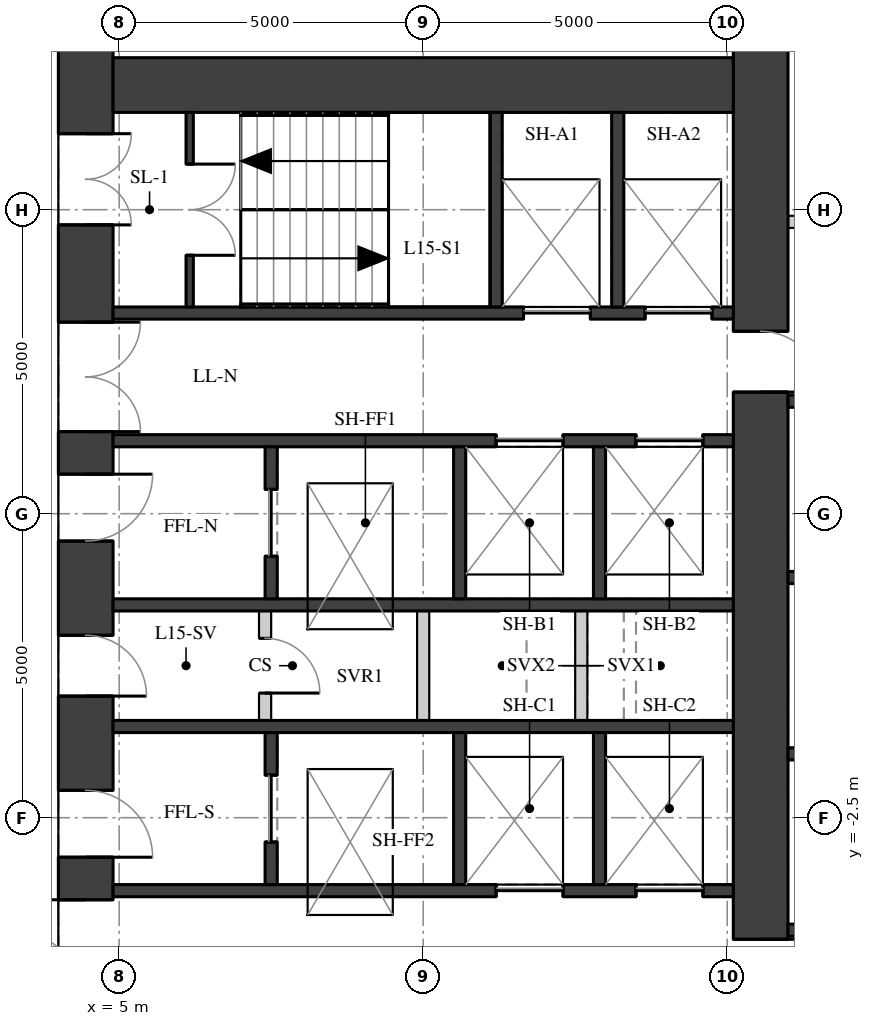
"""IFC4 building model, lengths in metres.
Left out: names, types, materials, properties, quantities, classifications, styles, units other than length and angle.
Written with IfcOpenShell. Run it as: python <this file> out.ifc"""

import sys

from ifc_helpers import new_model, si_unit, direction, frame, frame_2d, origin, place, context, subcontext, project, spatial, rectangle, extrude, element, fill, save


model = new_model("IFC4")
c1 = context("Model", 3, precision=1e-05, world=origin(), true_north=direction((0.0, 1.0)))
c2 = subcontext(c1, "Body", "Model", "MODEL_VIEW")
j1 = project(units=[si_unit("LENGTHUNIT", "METRE"), si_unit("PLANEANGLEUNIT", "RADIAN")], contexts=[c1])
p1 = place(None, origin())
s1 = spatial("IfcSite", under=j1, at=p1, CompositionType="ELEMENT")
p2 = place(p1, origin())
s2 = spatial("IfcBuilding", under=s1, at=p2, CompositionType="ELEMENT")
p3 = place(p2, frame((0.0, 0.0, 58.0)))
s3 = spatial("IfcBuildingStorey", under=s2, at=p3, CompositionType="ELEMENT", Elevation=58.0)
p4 = place(p3, frame((4.45, -11.1, 0.0), z_axis=(0.0, 0.0, 1.0), x_axis=(0.0, 1.0, 0.0)))
e1 = element("IfcWall", 1, at=p4, inside=s3, PredefinedType="SHEAR", context=c2, shape_type="SweptSolid", body=[
    extrude(rectangle(XDim=22.2, YDim=0.9, at=frame_2d((11.1, 0.0))), origin(), (0.0, 0.0, 1.0), 3.02),
])
p5 = place(p4, frame((2.35, 0.0, 0.0)))
e2 = element("IfcOpeningElement", 2, at=p5, cuts=e1, PredefinedType="OPENING", context=c2, shape_type="SweptSolid", body=[
    extrude(rectangle(XDim=1.5, YDim=2.1, at=frame_2d((0.75, 1.05))), frame((0.0, 0.46, 0.0), z_axis=(0.0, -1.0, 0.0), x_axis=(1.0, 0.0, 0.0)), (0.0, 0.0, 1.0), 0.92),
])
p6 = place(p4, frame((5.45, 0.0, 0.0)))
e3 = element("IfcOpeningElement", 3, at=p6, cuts=e1, PredefinedType="OPENING", context=c2, shape_type="SweptSolid", body=[
    extrude(rectangle(XDim=1.8, YDim=2.1, at=frame_2d((0.9, 1.05))), frame((0.0, 0.46, 0.0), z_axis=(0.0, -1.0, 0.0), x_axis=(1.0, 0.0, 0.0)), (0.0, 0.0, 1.0), 0.92),
])
p7 = place(p4, frame((7.95, 0.0, 0.0)))
e4 = element("IfcOpeningElement", 4, at=p7, cuts=e1, PredefinedType="OPENING", context=c2, shape_type="SweptSolid", body=[
    extrude(rectangle(XDim=1.1, YDim=2.1, at=frame_2d((0.55, 1.05))), frame((0.0, 0.46, 0.0), z_axis=(0.0, -1.0, 0.0), x_axis=(1.0, 0.0, 0.0)), (0.0, 0.0, 1.0), 0.92),
])
p8 = place(p4, frame((10.6, 0.0, 0.0)))
e5 = element("IfcOpeningElement", 5, at=p8, cuts=e1, PredefinedType="OPENING", context=c2, shape_type="SweptSolid", body=[
    extrude(rectangle(XDim=1.0, YDim=2.1, at=frame_2d((0.5, 1.05))), frame((0.0, 0.46, 0.0), z_axis=(0.0, -1.0, 0.0), x_axis=(1.0, 0.0, 0.0)), (0.0, 0.0, 1.0), 0.92),
])
p9 = place(p4, frame((13.15, 0.0, 0.0)))
e6 = element("IfcOpeningElement", 6, at=p9, cuts=e1, PredefinedType="OPENING", context=c2, shape_type="SweptSolid", body=[
    extrude(rectangle(XDim=1.1, YDim=2.1, at=frame_2d((0.55, 1.05))), frame((0.0, 0.46, 0.0), z_axis=(0.0, -1.0, 0.0), x_axis=(1.0, 0.0, 0.0)), (0.0, 0.0, 1.0), 0.92),
])
p10 = place(p4, frame((14.95, 0.0, 0.0)))
e7 = element("IfcOpeningElement", 7, at=p10, cuts=e1, PredefinedType="OPENING", context=c2, shape_type="SweptSolid", body=[
    extrude(rectangle(XDim=1.8, YDim=2.1, at=frame_2d((0.9, 1.05))), frame((0.0, 0.46, 0.0), z_axis=(0.0, -1.0, 0.0), x_axis=(1.0, 0.0, 0.0)), (0.0, 0.0, 1.0), 0.92),
])
p11 = place(p4, frame((18.35, 0.0, 0.0)))
e8 = element("IfcOpeningElement", 8, at=p11, cuts=e1, PredefinedType="OPENING", context=c2, shape_type="SweptSolid", body=[
    extrude(rectangle(XDim=1.5, YDim=2.1, at=frame_2d((0.75, 1.05))), frame((0.0, 0.46, 0.0), z_axis=(0.0, -1.0, 0.0), x_axis=(1.0, 0.0, 0.0)), (0.0, 0.0, 1.0), 0.92),
])
p12 = place(p3, frame((15.55, -11.1, 0.0), z_axis=(0.0, 0.0, 1.0), x_axis=(0.0, 1.0, 0.0)))
e9 = element("IfcWall", 9, at=p12, inside=s3, PredefinedType="SHEAR", context=c2, shape_type="SweptSolid", body=[
    extrude(rectangle(XDim=22.2, YDim=0.9, at=frame_2d((11.1, 0.0))), origin(), (0.0, 0.0, 1.0), 3.02),
])
p13 = place(p12, frame((15.6, 0.0, 0.0)))
e10 = element("IfcOpeningElement", 10, at=p13, cuts=e9, PredefinedType="OPENING", context=c2, shape_type="SweptSolid", body=[
    extrude(rectangle(XDim=1.0, YDim=2.1, at=frame_2d((0.5, 1.05))), frame((0.0, 0.46, 0.0), z_axis=(0.0, -1.0, 0.0), x_axis=(1.0, 0.0, 0.0)), (0.0, 0.0, 1.0), 0.92),
])
p14 = place(p12, frame((5.6, 0.0, 0.0)))
e11 = element("IfcOpeningElement", 11, at=p14, cuts=e9, PredefinedType="OPENING", context=c2, shape_type="SweptSolid", body=[
    extrude(rectangle(XDim=1.0, YDim=2.1, at=frame_2d((0.5, 1.05))), frame((0.0, 0.46, 0.0), z_axis=(0.0, -1.0, 0.0), x_axis=(1.0, 0.0, 0.0)), (0.0, 0.0, 1.0), 0.92),
])
p15 = place(p3, frame((4.9, 9.55, 0.0), z_axis=(0.0, 0.0, 1.0), x_axis=(1.0, 0.0, 0.0)))
e12 = element("IfcWall", 12, at=p15, inside=s3, PredefinedType="SHEAR", context=c2, shape_type="SweptSolid", body=[
    extrude(rectangle(XDim=10.2, YDim=0.9, at=frame_2d((5.1, 0.0))), origin(), (0.0, 0.0, 1.0), 3.02),
])
p16 = place(p3, frame((4.9, 5.8, 0.0), z_axis=(0.0, 0.0, 1.0), x_axis=(1.0, 0.0, 0.0)))
e13 = element("IfcWall", 13, at=p16, inside=s3, PredefinedType="SHEAR", context=c2, shape_type="SweptSolid", body=[
    extrude(rectangle(XDim=10.2, YDim=0.2, at=frame_2d((5.1, 0.0))), origin(), (0.0, 0.0, 1.0), 3.02),
])
p17 = place(p16, frame((6.75, 0.0, 0.0)))
e14 = element("IfcOpeningElement", 14, at=p17, cuts=e13, PredefinedType="OPENING", context=c2, shape_type="SweptSolid", body=[
    extrude(rectangle(XDim=1.1, YDim=2.1, at=frame_2d((0.55, 1.05))), frame((0.0, 0.11, 0.0), z_axis=(0.0, -1.0, 0.0), x_axis=(1.0, 0.0, 0.0)), (0.0, 0.0, 1.0), 0.22),
])
p18 = place(p16, frame((8.75, 0.0, 0.0)))
e15 = element("IfcOpeningElement", 15, at=p18, cuts=e13, PredefinedType="OPENING", context=c2, shape_type="SweptSolid", body=[
    extrude(rectangle(XDim=1.1, YDim=2.1, at=frame_2d((0.55, 1.05))), frame((0.0, 0.11, 0.0), z_axis=(0.0, -1.0, 0.0), x_axis=(1.0, 0.0, 0.0)), (0.0, 0.0, 1.0), 0.22),
])
p19 = place(p3, frame((4.9, 3.7, 0.0), z_axis=(0.0, 0.0, 1.0), x_axis=(1.0, 0.0, 0.0)))
e16 = element("IfcWall", 16, at=p19, inside=s3, PredefinedType="SHEAR", context=c2, shape_type="SweptSolid", body=[
    extrude(rectangle(XDim=10.2, YDim=0.2, at=frame_2d((5.1, 0.0))), origin(), (0.0, 0.0, 1.0), 3.02),
])
p20 = place(p19, frame((6.3, 0.0, 0.0)))
e17 = element("IfcOpeningElement", 17, at=p20, cuts=e16, PredefinedType="OPENING", context=c2, shape_type="SweptSolid", body=[
    extrude(rectangle(XDim=1.1, YDim=2.1, at=frame_2d((0.55, 1.05))), frame((0.0, 0.11, 0.0), z_axis=(0.0, -1.0, 0.0), x_axis=(1.0, 0.0, 0.0)), (0.0, 0.0, 1.0), 0.22),
])
p21 = place(p19, frame((8.6, 0.0, 0.0)))
e18 = element("IfcOpeningElement", 18, at=p21, cuts=e16, PredefinedType="OPENING", context=c2, shape_type="SweptSolid", body=[
    extrude(rectangle(XDim=1.1, YDim=2.1, at=frame_2d((0.55, 1.05))), frame((0.0, 0.11, 0.0), z_axis=(0.0, -1.0, 0.0), x_axis=(1.0, 0.0, 0.0)), (0.0, 0.0, 1.0), 0.22),
])
for number, where, z_axis, x_axis in (
    (19, (4.9, 1.0, 0.0), (0.0, 0.0, 1.0), (1.0, 0.0, 0.0)),
    (20, (4.9, -1.0, 0.0), (0.0, 0.0, 1.0), (1.0, 0.0, 0.0)),
):
    element("IfcWall", number, at=place(p3, frame(where, z_axis=z_axis, x_axis=x_axis)), inside=s3, PredefinedType="SHEAR", context=c2, shape_type="SweptSolid", body=[
        extrude(rectangle(XDim=10.2, YDim=0.2, at=frame_2d((5.1, 0.0))), origin(), (0.0, 0.0, 1.0), 3.02),
    ])
p22 = place(p3, frame((4.9, -3.7, 0.0), z_axis=(0.0, 0.0, 1.0), x_axis=(1.0, 0.0, 0.0)))
e21 = element("IfcWall", 21, at=p22, inside=s3, PredefinedType="SHEAR", context=c2, shape_type="SweptSolid", body=[
    extrude(rectangle(XDim=10.2, YDim=0.2, at=frame_2d((5.1, 0.0))), origin(), (0.0, 0.0, 1.0), 3.02),
])
p23 = place(p22, frame((6.3, 0.0, 0.0)))
e22 = element("IfcOpeningElement", 22, at=p23, cuts=e21, PredefinedType="OPENING", context=c2, shape_type="SweptSolid", body=[
    extrude(rectangle(XDim=1.1, YDim=2.1, at=frame_2d((0.55, 1.05))), frame((0.0, 0.11, 0.0), z_axis=(0.0, -1.0, 0.0), x_axis=(1.0, 0.0, 0.0)), (0.0, 0.0, 1.0), 0.22),
])
p24 = place(p22, frame((8.6, 0.0, 0.0)))
e23 = element("IfcOpeningElement", 23, at=p24, cuts=e21, PredefinedType="OPENING", context=c2, shape_type="SweptSolid", body=[
    extrude(rectangle(XDim=1.1, YDim=2.1, at=frame_2d((0.55, 1.05))), frame((0.0, 0.11, 0.0), z_axis=(0.0, -1.0, 0.0), x_axis=(1.0, 0.0, 0.0)), (0.0, 0.0, 1.0), 0.22),
])
for number, where, z_axis, x_axis in (
    (24, (11.2, 5.9, 0.0), (0.0, 0.0, 1.0), (0.0, 1.0, 0.0)),
    (25, (13.2, 5.9, 0.0), (0.0, 0.0, 1.0), (0.0, 1.0, 0.0)),
):
    element("IfcWall", number, at=place(p3, frame(where, z_axis=z_axis, x_axis=x_axis)), inside=s3, PredefinedType="SHEAR", context=c2, shape_type="SweptSolid", body=[
        extrude(rectangle(XDim=3.2, YDim=0.2, at=frame_2d((1.6, 0.0))), origin(), (0.0, 0.0, 1.0), 3.02),
    ])
p25 = place(p3, frame((7.5, 1.1, 0.0), z_axis=(0.0, 0.0, 1.0), x_axis=(0.0, 1.0, 0.0)))
e26 = element("IfcWall", 26, at=p25, inside=s3, PredefinedType="SHEAR", context=c2, shape_type="SweptSolid", body=[
    extrude(rectangle(XDim=2.5, YDim=0.2, at=frame_2d((1.25, 0.0))), origin(), (0.0, 0.0, 1.0), 3.02),
])
p26 = place(p25, frame((0.7, 0.0, 0.0)))
e27 = element("IfcOpeningElement", 27, at=p26, cuts=e26, PredefinedType="OPENING", context=c2, shape_type="SweptSolid", body=[
    extrude(rectangle(XDim=1.1, YDim=2.1, at=frame_2d((0.55, 1.05))), frame((0.0, 0.11, 0.0), z_axis=(0.0, -1.0, 0.0), x_axis=(1.0, 0.0, 0.0)), (0.0, 0.0, 1.0), 0.22),
])
p27 = place(p3, frame((7.5, -3.6, 0.0), z_axis=(0.0, 0.0, 1.0), x_axis=(0.0, 1.0, 0.0)))
e28 = element("IfcWall", 28, at=p27, inside=s3, PredefinedType="SHEAR", context=c2, shape_type="SweptSolid", body=[
    extrude(rectangle(XDim=2.5, YDim=0.2, at=frame_2d((1.25, 0.0))), origin(), (0.0, 0.0, 1.0), 3.02),
])
p28 = place(p27, frame((0.7, 0.0, 0.0)))
e29 = element("IfcOpeningElement", 29, at=p28, cuts=e28, PredefinedType="OPENING", context=c2, shape_type="SweptSolid", body=[
    extrude(rectangle(XDim=1.1, YDim=2.1, at=frame_2d((0.55, 1.05))), frame((0.0, 0.11, 0.0), z_axis=(0.0, -1.0, 0.0), x_axis=(1.0, 0.0, 0.0)), (0.0, 0.0, 1.0), 0.22),
])
for number, where, z_axis, x_axis in (
    (30, (10.6, 1.1, 0.0), (0.0, 0.0, 1.0), (0.0, 1.0, 0.0)),
    (31, (10.6, -3.6, 0.0), (0.0, 0.0, 1.0), (0.0, 1.0, 0.0)),
    (32, (12.9, 1.1, 0.0), (0.0, 0.0, 1.0), (0.0, 1.0, 0.0)),
    (33, (12.9, -3.6, 0.0), (0.0, 0.0, 1.0), (0.0, 1.0, 0.0)),
):
    element("IfcWall", number, at=place(p3, frame(where, z_axis=z_axis, x_axis=x_axis)), inside=s3, PredefinedType="SHEAR", context=c2, shape_type="SweptSolid", body=[
        extrude(rectangle(XDim=2.5, YDim=0.2, at=frame_2d((1.25, 0.0))), origin(), (0.0, 0.0, 1.0), 3.02),
    ])
p29 = place(p3, frame((6.16, 5.9, 0.0), z_axis=(0.0, 0.0, 1.0), x_axis=(0.0, 1.0, 0.0)))
e34 = element("IfcWall", 34, at=p29, inside=s3, PredefinedType="SHEAR", context=c2, shape_type="SweptSolid", body=[
    extrude(rectangle(XDim=3.2, YDim=0.12, at=frame_2d((1.6, 0.0))), origin(), (0.0, 0.0, 1.0), 3.02),
])
p30 = place(p29, frame((0.85, 0.0, 0.0)))
e35 = element("IfcOpeningElement", 35, at=p30, cuts=e34, PredefinedType="OPENING", context=c2, shape_type="SweptSolid", body=[
    extrude(rectangle(XDim=1.5, YDim=2.1, at=frame_2d((0.75, 1.05))), frame((0.0, 0.07, 0.0), z_axis=(0.0, -1.0, 0.0), x_axis=(1.0, 0.0, 0.0)), (0.0, 0.0, 1.0), 0.14),
])
p31 = place(p3, frame((7.4, -0.9, 0.0), z_axis=(0.0, 0.0, 1.0), x_axis=(0.0, 1.0, 0.0)))
e36 = element("IfcWall", 36, at=p31, inside=s3, PredefinedType="PARTITIONING", context=c2, shape_type="SweptSolid", body=[
    extrude(rectangle(XDim=1.8, YDim=0.2, at=frame_2d((0.9, 0.0))), origin(), (0.0, 0.0, 1.0), 3.02),
])
p32 = place(p31, frame((0.45, 0.0, 0.0)))
e37 = element("IfcOpeningElement", 37, at=p32, cuts=e36, PredefinedType="OPENING", context=c2, shape_type="SweptSolid", body=[
    extrude(rectangle(XDim=0.9, YDim=2.1, at=frame_2d((0.45, 1.05))), frame((0.0, 0.11, 0.0), z_axis=(0.0, -1.0, 0.0), x_axis=(1.0, 0.0, 0.0)), (0.0, 0.0, 1.0), 0.22),
])
for number, where, z_axis, x_axis in (
    (38, (10.0, -0.9, 0.0), (0.0, 0.0, 1.0), (0.0, 1.0, 0.0)),
    (39, (12.6, -0.9, 0.0), (0.0, 0.0, 1.0), (0.0, 1.0, 0.0)),
):
    element("IfcWall", number, at=place(p3, frame(where, z_axis=z_axis, x_axis=x_axis)), inside=s3, PredefinedType="PARTITIONING", context=c2, shape_type="SweptSolid", body=[
        extrude(rectangle(XDim=1.8, YDim=0.2, at=frame_2d((0.9, 0.0))), origin(), (0.0, 0.0, 1.0), 3.02),
    ])
for number, where, z_axis, x_axis in (
    (40, (16.0, -4.35, 0.0), (0.0, 0.0, 1.0), (1.0, 0.0, 0.0)),
    (41, (16.0, -1.45, 0.0), (0.0, 0.0, 1.0), (1.0, 0.0, 0.0)),
    (42, (16.0, 1.45, 0.0), (0.0, 0.0, 1.0), (1.0, 0.0, 0.0)),
    (43, (16.0, 4.35, 0.0), (0.0, 0.0, 1.0), (1.0, 0.0, 0.0)),
):
    element("IfcWall", number, at=place(p3, frame(where, z_axis=z_axis, x_axis=x_axis)), inside=s3, PredefinedType="SHEAR", context=c2, shape_type="SweptSolid", body=[
        extrude(rectangle(XDim=2.3, YDim=0.2, at=frame_2d((1.15, 0.0))), origin(), (0.0, 0.0, 1.0), 3.02),
    ])
p33 = place(p3, frame((16.0, 7.3, 0.0), z_axis=(0.0, 0.0, 1.0), x_axis=(1.0, 0.0, 0.0)))
e44 = element("IfcWall", 44, at=p33, inside=s3, PredefinedType="PARTITIONING", context=c2, shape_type="SweptSolid", body=[
    extrude(rectangle(XDim=2.3, YDim=0.2, at=frame_2d((1.15, 0.0))), origin(), (0.0, 0.0, 1.0), 3.02),
])
p34 = place(p33, frame((0.2, 0.0, 0.0)))
e45 = element("IfcOpeningElement", 45, at=p34, cuts=e44, PredefinedType="OPENING", context=c2, shape_type="SweptSolid", body=[
    extrude(rectangle(XDim=0.9, YDim=2.1, at=frame_2d((0.45, 1.05))), frame((0.0, 0.11, 0.0), z_axis=(0.0, -1.0, 0.0), x_axis=(1.0, 0.0, 0.0)), (0.0, 0.0, 1.0), 0.22),
])
p35 = place(p6, origin())
e46 = element("IfcDoor", 46, at=p35, inside=s3, OperationType="DOUBLE_DOOR_SINGLE_SWING", PredefinedType="DOOR", context=c2, shape_type="SweptSolid", body=[
    extrude(rectangle(XDim=1.8, YDim=2.1, at=frame_2d((0.9, 1.05))), frame((0.0, 0.025, 0.0), z_axis=(0.0, -1.0, 0.0), x_axis=(1.0, 0.0, 0.0)), (0.0, 0.0, 1.0), 0.05),
])
fill(e3, e46)
p36 = place(p7, origin())
e47 = element("IfcDoor", 47, at=p36, inside=s3, OperationType="SINGLE_SWING_RIGHT", PredefinedType="DOOR", context=c2, shape_type="SweptSolid", body=[
    extrude(rectangle(XDim=1.1, YDim=2.1, at=frame_2d((0.55, 1.05))), frame((0.0, 0.025, 0.0), z_axis=(0.0, -1.0, 0.0), x_axis=(1.0, 0.0, 0.0)), (0.0, 0.0, 1.0), 0.05),
])
fill(e4, e47)
p37 = place(p8, origin())
e48 = element("IfcDoor", 48, at=p37, inside=s3, OperationType="SINGLE_SWING_RIGHT", PredefinedType="DOOR", context=c2, shape_type="SweptSolid", body=[
    extrude(rectangle(XDim=1.0, YDim=2.1, at=frame_2d((0.5, 1.05))), frame((0.0, 0.025, 0.0), z_axis=(0.0, -1.0, 0.0), x_axis=(1.0, 0.0, 0.0)), (0.0, 0.0, 1.0), 0.05),
])
fill(e5, e48)
p38 = place(p9, origin())
e49 = element("IfcDoor", 49, at=p38, inside=s3, OperationType="SINGLE_SWING_LEFT", PredefinedType="DOOR", context=c2, shape_type="SweptSolid", body=[
    extrude(rectangle(XDim=1.1, YDim=2.1, at=frame_2d((0.55, 1.05))), frame((0.0, 0.025, 0.0), z_axis=(0.0, -1.0, 0.0), x_axis=(1.0, 0.0, 0.0)), (0.0, 0.0, 1.0), 0.05),
])
fill(e6, e49)
p39 = place(p10, origin())
e50 = element("IfcDoor", 50, at=p39, inside=s3, OperationType="DOUBLE_DOOR_SINGLE_SWING", PredefinedType="DOOR", context=c2, shape_type="SweptSolid", body=[
    extrude(rectangle(XDim=1.8, YDim=2.1, at=frame_2d((0.9, 1.05))), frame((0.0, 0.025, 0.0), z_axis=(0.0, -1.0, 0.0), x_axis=(1.0, 0.0, 0.0)), (0.0, 0.0, 1.0), 0.05),
])
fill(e7, e50)
p40 = place(p11, origin())
e51 = element("IfcDoor", 51, at=p40, inside=s3, OperationType="DOUBLE_DOOR_SINGLE_SWING", PredefinedType="DOOR", context=c2, shape_type="SweptSolid", body=[
    extrude(rectangle(XDim=1.5, YDim=2.1, at=frame_2d((0.75, 1.05))), frame((0.0, 0.025, 0.0), z_axis=(0.0, -1.0, 0.0), x_axis=(1.0, 0.0, 0.0)), (0.0, 0.0, 1.0), 0.05),
])
fill(e8, e51)
p41 = place(p30, origin())
e52 = element("IfcDoor", 52, at=p41, inside=s3, OperationType="DOUBLE_DOOR_SINGLE_SWING", PredefinedType="DOOR", context=c2, shape_type="SweptSolid", body=[
    extrude(rectangle(XDim=1.5, YDim=2.1, at=frame_2d((0.75, 1.05))), frame((0.0, 0.025, 0.0), z_axis=(0.0, -1.0, 0.0), x_axis=(1.0, 0.0, 0.0)), (0.0, 0.0, 1.0), 0.05),
])
fill(e35, e52)
p42 = place(p17, origin())
e53 = element("IfcDoor", 53, at=p42, inside=s3, OperationType="DOUBLE_DOOR_SLIDING", PredefinedType="DOOR", context=c2, shape_type="SweptSolid", body=[
    extrude(rectangle(XDim=1.1, YDim=2.1, at=frame_2d((0.55, 1.05))), frame((0.0, 0.025, 0.0), z_axis=(0.0, -1.0, 0.0), x_axis=(1.0, 0.0, 0.0)), (0.0, 0.0, 1.0), 0.05),
])
fill(e14, e53)
p43 = place(p18, origin())
e54 = element("IfcDoor", 54, at=p43, inside=s3, OperationType="DOUBLE_DOOR_SLIDING", PredefinedType="DOOR", context=c2, shape_type="SweptSolid", body=[
    extrude(rectangle(XDim=1.1, YDim=2.1, at=frame_2d((0.55, 1.05))), frame((0.0, 0.025, 0.0), z_axis=(0.0, -1.0, 0.0), x_axis=(1.0, 0.0, 0.0)), (0.0, 0.0, 1.0), 0.05),
])
fill(e15, e54)
p44 = place(p20, origin())
e55 = element("IfcDoor", 55, at=p44, inside=s3, OperationType="DOUBLE_DOOR_SLIDING", PredefinedType="DOOR", context=c2, shape_type="SweptSolid", body=[
    extrude(rectangle(XDim=1.1, YDim=2.1, at=frame_2d((0.55, 1.05))), frame((0.0, 0.025, 0.0), z_axis=(0.0, -1.0, 0.0), x_axis=(1.0, 0.0, 0.0)), (0.0, 0.0, 1.0), 0.05),
])
fill(e17, e55)
p45 = place(p21, origin())
e56 = element("IfcDoor", 56, at=p45, inside=s3, OperationType="DOUBLE_DOOR_SLIDING", PredefinedType="DOOR", context=c2, shape_type="SweptSolid", body=[
    extrude(rectangle(XDim=1.1, YDim=2.1, at=frame_2d((0.55, 1.05))), frame((0.0, 0.025, 0.0), z_axis=(0.0, -1.0, 0.0), x_axis=(1.0, 0.0, 0.0)), (0.0, 0.0, 1.0), 0.05),
])
fill(e18, e56)
p46 = place(p23, origin())
e57 = element("IfcDoor", 57, at=p46, inside=s3, OperationType="DOUBLE_DOOR_SLIDING", PredefinedType="DOOR", context=c2, shape_type="SweptSolid", body=[
    extrude(rectangle(XDim=1.1, YDim=2.1, at=frame_2d((0.55, 1.05))), frame((0.0, 0.025, 0.0), z_axis=(0.0, -1.0, 0.0), x_axis=(1.0, 0.0, 0.0)), (0.0, 0.0, 1.0), 0.05),
])
fill(e22, e57)
p47 = place(p24, origin())
e58 = element("IfcDoor", 58, at=p47, inside=s3, OperationType="DOUBLE_DOOR_SLIDING", PredefinedType="DOOR", context=c2, shape_type="SweptSolid", body=[
    extrude(rectangle(XDim=1.1, YDim=2.1, at=frame_2d((0.55, 1.05))), frame((0.0, 0.025, 0.0), z_axis=(0.0, -1.0, 0.0), x_axis=(1.0, 0.0, 0.0)), (0.0, 0.0, 1.0), 0.05),
])
fill(e23, e58)
p48 = place(p26, origin())
e59 = element("IfcDoor", 59, at=p48, inside=s3, OperationType="DOUBLE_DOOR_SLIDING", PredefinedType="DOOR", context=c2, shape_type="SweptSolid", body=[
    extrude(rectangle(XDim=1.1, YDim=2.1, at=frame_2d((0.55, 1.05))), frame((0.0, 0.025, 0.0), z_axis=(0.0, -1.0, 0.0), x_axis=(1.0, 0.0, 0.0)), (0.0, 0.0, 1.0), 0.05),
])
fill(e27, e59)
p49 = place(p28, origin())
e60 = element("IfcDoor", 60, at=p49, inside=s3, OperationType="DOUBLE_DOOR_SLIDING", PredefinedType="DOOR", context=c2, shape_type="SweptSolid", body=[
    extrude(rectangle(XDim=1.1, YDim=2.1, at=frame_2d((0.55, 1.05))), frame((0.0, 0.025, 0.0), z_axis=(0.0, -1.0, 0.0), x_axis=(1.0, 0.0, 0.0)), (0.0, 0.0, 1.0), 0.05),
])
fill(e29, e60)
p50 = place(p32, origin())
e61 = element("IfcDoor", 61, at=p50, inside=s3, OperationType="SINGLE_SWING_RIGHT", PredefinedType="DOOR", context=c2, shape_type="SweptSolid", body=[
    extrude(rectangle(XDim=0.9, YDim=2.1, at=frame_2d((0.45, 1.05))), frame((0.0, 0.025, 0.0), z_axis=(0.0, -1.0, 0.0), x_axis=(1.0, 0.0, 0.0)), (0.0, 0.0, 1.0), 0.05),
])
fill(e37, e61)
p51 = place(p13, origin())
e62 = element("IfcDoor", 62, at=p51, inside=s3, OperationType="SINGLE_SWING_RIGHT", PredefinedType="DOOR", context=c2, shape_type="SweptSolid", body=[
    extrude(rectangle(XDim=1.0, YDim=2.1, at=frame_2d((0.5, 1.05))), frame((0.0, 0.025, 0.0), z_axis=(0.0, -1.0, 0.0), x_axis=(1.0, 0.0, 0.0)), (0.0, 0.0, 1.0), 0.05),
])
fill(e10, e62)
p52 = place(p14, origin())
e63 = element("IfcDoor", 63, at=p52, inside=s3, OperationType="SINGLE_SWING_LEFT", PredefinedType="DOOR", context=c2, shape_type="SweptSolid", body=[
    extrude(rectangle(XDim=1.0, YDim=2.1, at=frame_2d((0.5, 1.05))), frame((0.0, 0.025, 0.0), z_axis=(0.0, -1.0, 0.0), x_axis=(1.0, 0.0, 0.0)), (0.0, 0.0, 1.0), 0.05),
])
fill(e11, e63)
save(model, sys.argv[1])
